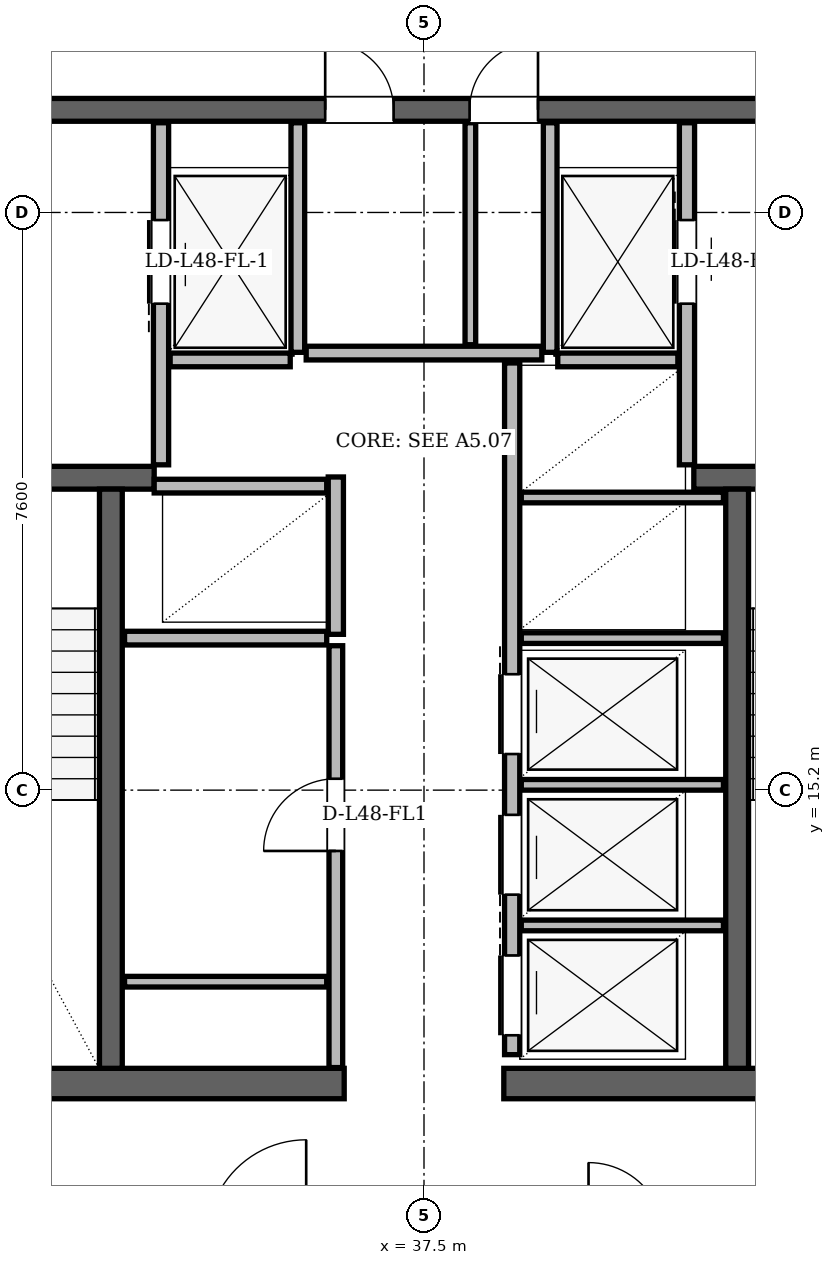
"""IFC4 building model, lengths in metres.
Left out: names, types, materials, properties, quantities, classifications, styles, units other than length and angle.
Written with IfcOpenShell. Run it as: python <this file> out.ifc"""

import sys

from ifc_helpers import new_model, si_unit, direction, frame, frame_2d, origin, place, context, subcontext, project, spatial, rectangle, extrude, element, fill, save


model = new_model("IFC4")
c1 = context("Model", 3, precision=1e-05, world=origin(), true_north=direction((0.0, 1.0)))
c2 = subcontext(c1, "Body", "Model", "MODEL_VIEW")
j1 = project(units=[si_unit("LENGTHUNIT", "METRE"), si_unit("PLANEANGLEUNIT", "RADIAN")], contexts=[c1])
p1 = place(None, origin())
s1 = spatial("IfcSite", under=j1, at=p1, CompositionType="ELEMENT")
p2 = place(p1, origin())
s2 = spatial("IfcBuilding", under=s1, at=p2, CompositionType="ELEMENT")
p3 = place(p2, frame((0.0, 0.0, 181.8)))
s3 = spatial("IfcBuildingStorey", under=s2, at=p3, CompositionType="ELEMENT", Elevation=181.8)
for number, where, z_axis, x_axis in (
    (1, (29.35, 11.34, 0.0), (0.0, 0.0, 1.0), (1.0, 0.0, 0.0)),
    (2, (38.55, 11.34, 0.0), (0.0, 0.0, 1.0), (1.0, 0.0, 0.0)),
):
    element("IfcWall", number, at=place(p3, frame(where, z_axis=z_axis, x_axis=x_axis)), inside=s3, PredefinedType="SHEAR", context=c2, shape_type="SweptSolid", body=[
        extrude(rectangle(XDim=7.1, YDim=0.4, at=frame_2d((3.55, 0.0))), origin(), (0.0, 0.0, 1.0), 3.38),
    ])
p4 = place(p3, frame((29.65, 24.15, 0.0), z_axis=(0.0, 0.0, 1.0), x_axis=(1.0, 0.0, 0.0)))
e3 = element("IfcWall", 3, at=p4, inside=s3, PredefinedType="SHEAR", context=c2, shape_type="SweptSolid", body=[
    extrude(rectangle(XDim=15.7, YDim=0.3, at=frame_2d((7.85, 0.0))), origin(), (0.0, 0.0, 1.0), 3.38),
])
p5 = place(p4, frame((1.7, 0.0, 0.0)))
e4 = element("IfcOpeningElement", 4, at=p5, cuts=e3, PredefinedType="OPENING", context=c2, shape_type="SweptSolid", body=[
    extrude(rectangle(XDim=1.2, YDim=2.2, at=frame_2d((0.6, 1.1))), frame((0.0, 0.15, 0.0), z_axis=(0.0, -1.0, 0.0), x_axis=(1.0, 0.0, 0.0)), (0.0, 0.0, 1.0), 0.3),
])
p6 = place(p4, frame((12.8, 0.0, 0.0)))
e5 = element("IfcOpeningElement", 5, at=p6, cuts=e3, PredefinedType="OPENING", context=c2, shape_type="SweptSolid", body=[
    extrude(rectangle(XDim=1.2, YDim=2.2, at=frame_2d((0.6, 1.1))), frame((0.0, 0.15, 0.0), z_axis=(0.0, -1.0, 0.0), x_axis=(1.0, 0.0, 0.0)), (0.0, 0.0, 1.0), 0.3),
])
p7 = place(p4, frame((6.55, 0.0, 0.0)))
e6 = element("IfcOpeningElement", 6, at=p7, cuts=e3, PredefinedType="OPENING", context=c2, shape_type="SweptSolid", body=[
    extrude(rectangle(XDim=0.9, YDim=2.05, at=frame_2d((0.45, 1.025))), frame((0.0, 0.15, 0.0), z_axis=(0.0, -1.0, 0.0), x_axis=(1.0, 0.0, 0.0)), (0.0, 0.0, 1.0), 0.3),
])
p8 = place(p4, frame((8.45, 0.0, 0.0)))
e7 = element("IfcOpeningElement", 7, at=p8, cuts=e3, PredefinedType="OPENING", context=c2, shape_type="SweptSolid", body=[
    extrude(rectangle(XDim=0.9, YDim=2.05, at=frame_2d((0.45, 1.025))), frame((0.0, 0.15, 0.0), z_axis=(0.0, -1.0, 0.0), x_axis=(1.0, 0.0, 0.0)), (0.0, 0.0, 1.0), 0.3),
])
p9 = place(p3, frame((29.94, 19.31, 0.0), z_axis=(0.0, 0.0, 1.0), x_axis=(1.0, 0.0, 0.0)))
e8 = element("IfcWall", 8, at=p9, inside=s3, PredefinedType="SHEAR", context=c2, shape_type="SweptSolid", body=[
    extrude(rectangle(XDim=4.01, YDim=0.3, at=frame_2d((2.005, 0.0))), origin(), (0.0, 0.0, 1.0), 3.38),
])
p10 = place(p9, frame((1.01, 0.0, 0.0)))
e9 = element("IfcOpeningElement", 9, at=p10, cuts=e8, PredefinedType="OPENING", context=c2, shape_type="SweptSolid", body=[
    extrude(rectangle(XDim=1.4, YDim=2.2, at=frame_2d((0.7, 1.1))), frame((0.0, 0.15, 0.0), z_axis=(0.0, -1.0, 0.0), x_axis=(1.0, 0.0, 0.0)), (0.0, 0.0, 1.0), 0.3),
])
p11 = place(p3, frame((41.05, 19.31, 0.0), z_axis=(0.0, 0.0, 1.0), x_axis=(1.0, 0.0, 0.0)))
e10 = element("IfcWall", 10, at=p11, inside=s3, PredefinedType="SHEAR", context=c2, shape_type="SweptSolid", body=[
    extrude(rectangle(XDim=4.01, YDim=0.3, at=frame_2d((2.005, 0.0))), origin(), (0.0, 0.0, 1.0), 3.38),
])
p12 = place(p11, frame((1.6, 0.0, 0.0)))
e11 = element("IfcOpeningElement", 11, at=p12, cuts=e10, PredefinedType="OPENING", context=c2, shape_type="SweptSolid", body=[
    extrude(rectangle(XDim=1.4, YDim=2.2, at=frame_2d((0.7, 1.1))), frame((0.0, 0.15, 0.0), z_axis=(0.0, -1.0, 0.0), x_axis=(1.0, 0.0, 0.0)), (0.0, 0.0, 1.0), 0.3),
])
for number, where, z_axis, x_axis in (
    (12, (33.38, 11.54, 0.0), (0.0, 0.0, 1.0), (0.0, 1.0, 0.0)),
    (13, (41.62, 11.54, 0.0), (0.0, 0.0, 1.0), (0.0, 1.0, 0.0)),
):
    element("IfcWall", number, at=place(p3, frame(where, z_axis=z_axis, x_axis=x_axis)), inside=s3, PredefinedType="SHEAR", context=c2, shape_type="SweptSolid", body=[
        extrude(rectangle(XDim=7.62, YDim=0.3, at=frame_2d((3.81, 0.0))), origin(), (0.0, 0.0, 1.0), 3.38),
    ])
p13 = place(p3, frame((59.565, 12.024, 0.0), z_axis=(0.0, 0.0, 1.0), x_axis=(-0.499997559055, 0.86602681306, 0.0)))
e14 = element("IfcWall", 14, at=p13, inside=s3, PredefinedType="SOLIDWALL", context=c2, shape_type="SweptSolid", body=[
    extrude(rectangle(XDim=36.054, YDim=0.29, at=frame_2d((18.027, 0.0))), origin(), (0.0, 0.0, 1.0), 2.6),
])
p14 = place(p13, frame((3.429, 0.0, 0.0)))
e15 = element("IfcOpeningElement", 15, at=p14, cuts=e14, PredefinedType="OPENING", context=c2, shape_type="SweptSolid", body=[
    extrude(rectangle(XDim=1.5, YDim=2.2, at=frame_2d((0.75, 1.1))), frame((0.0, 0.145, 0.0), z_axis=(0.0, -1.0, 0.0), x_axis=(1.0, 0.0, 0.0)), (0.0, 0.0, 1.0), 0.29),
])
p15 = place(p13, frame((27.779, 0.0, 0.0)))
e16 = element("IfcOpeningElement", 16, at=p15, cuts=e14, PredefinedType="OPENING", context=c2, shape_type="SweptSolid", body=[
    extrude(rectangle(XDim=1.5, YDim=2.2, at=frame_2d((0.75, 1.1))), frame((0.0, 0.145, 0.0), z_axis=(0.0, -1.0, 0.0), x_axis=(1.0, 0.0, 0.0)), (0.0, 0.0, 1.0), 0.29),
])
p16 = place(p13, frame((1.672, 0.0, 0.85)))
e17 = element("IfcOpeningElement", 17, at=p16, cuts=e14, PredefinedType="OPENING", context=c2, shape_type="SweptSolid", body=[
    extrude(rectangle(XDim=1.2, YDim=1.48, at=frame_2d((0.6, 0.74))), frame((0.0, 0.145, 0.0), z_axis=(0.0, -1.0, 0.0), x_axis=(1.0, 0.0, 0.0)), (0.0, 0.0, 1.0), 0.29),
])
p17 = place(p13, frame((14.332, 0.0, 0.85)))
e18 = element("IfcOpeningElement", 18, at=p17, cuts=e14, PredefinedType="OPENING", context=c2, shape_type="SweptSolid", body=[
    extrude(rectangle(XDim=1.2, YDim=1.48, at=frame_2d((0.6, 0.74))), frame((0.0, 0.145, 0.0), z_axis=(0.0, -1.0, 0.0), x_axis=(1.0, 0.0, 0.0)), (0.0, 0.0, 1.0), 0.29),
])
p18 = place(p13, frame((21.605, 0.0, 0.85)))
e19 = element("IfcOpeningElement", 19, at=p18, cuts=e14, PredefinedType="OPENING", context=c2, shape_type="SweptSolid", body=[
    extrude(rectangle(XDim=2.8, YDim=1.64, at=frame_2d((1.4, 0.82))), frame((0.0, 0.145, 0.0), z_axis=(0.0, -1.0, 0.0), x_axis=(1.0, 0.0, 0.0)), (0.0, 0.0, 1.0), 0.29),
])
p19 = place(p13, frame((7.301, 0.0, 0.85)))
e20 = element("IfcOpeningElement", 20, at=p19, cuts=e14, PredefinedType="OPENING", context=c2, shape_type="SweptSolid", body=[
    extrude(rectangle(XDim=1.2, YDim=1.48, at=frame_2d((0.6, 0.74))), frame((0.0, 0.145, 0.0), z_axis=(0.0, -1.0, 0.0), x_axis=(1.0, 0.0, 0.0)), (0.0, 0.0, 1.0), 0.29),
])
p20 = place(p13, frame((25.885, 0.0, 0.85)))
e21 = element("IfcOpeningElement", 21, at=p20, cuts=e14, PredefinedType="OPENING", context=c2, shape_type="SweptSolid", body=[
    extrude(rectangle(XDim=1.2, YDim=1.48, at=frame_2d((0.6, 0.74))), frame((0.0, 0.145, 0.0), z_axis=(0.0, -1.0, 0.0), x_axis=(1.0, 0.0, 0.0)), (0.0, 0.0, 1.0), 0.29),
])
p21 = place(p13, frame((32.282, 0.0, 0.85)))
e22 = element("IfcOpeningElement", 22, at=p21, cuts=e14, PredefinedType="OPENING", context=c2, shape_type="SweptSolid", body=[
    extrude(rectangle(XDim=1.6, YDim=1.64, at=frame_2d((0.8, 0.82))), frame((0.0, 0.145, 0.0), z_axis=(0.0, -1.0, 0.0), x_axis=(1.0, 0.0, 0.0)), (0.0, 0.0, 1.0), 0.29),
])
p22 = place(p3, frame((33.461, 43.247, 0.0), z_axis=(0.0, 0.0, 1.0), x_axis=(-0.499997559055, -0.86602681306, 0.0)))
e23 = element("IfcWall", 23, at=p22, inside=s3, PredefinedType="SOLIDWALL", context=c2, shape_type="SweptSolid", body=[
    extrude(rectangle(XDim=36.054, YDim=0.29, at=frame_2d((18.027, 0.0))), origin(), (0.0, 0.0, 1.0), 2.6),
])
p23 = place(p22, frame((6.579, 0.0, 0.0)))
e24 = element("IfcOpeningElement", 24, at=p23, cuts=e23, PredefinedType="OPENING", context=c2, shape_type="SweptSolid", body=[
    extrude(rectangle(XDim=1.5, YDim=2.2, at=frame_2d((0.75, 1.1))), frame((0.0, 0.145, 0.0), z_axis=(0.0, -1.0, 0.0), x_axis=(1.0, 0.0, 0.0)), (0.0, 0.0, 1.0), 0.29),
])
p24 = place(p22, frame((26.519, 0.0, 0.0)))
e25 = element("IfcOpeningElement", 25, at=p24, cuts=e23, PredefinedType="OPENING", context=c2, shape_type="SweptSolid", body=[
    extrude(rectangle(XDim=1.5, YDim=2.2, at=frame_2d((0.75, 1.1))), frame((0.0, 0.145, 0.0), z_axis=(0.0, -1.0, 0.0), x_axis=(1.0, 0.0, 0.0)), (0.0, 0.0, 1.0), 0.29),
])
p25 = place(p22, frame((33.788, 0.0, 0.85)))
e26 = element("IfcOpeningElement", 26, at=p25, cuts=e23, PredefinedType="OPENING", context=c2, shape_type="SweptSolid", body=[
    extrude(rectangle(XDim=1.2, YDim=1.48, at=frame_2d((0.6, 0.74))), frame((0.0, 0.145, 0.0), z_axis=(0.0, -1.0, 0.0), x_axis=(1.0, 0.0, 0.0)), (0.0, 0.0, 1.0), 0.29),
])
p26 = place(p22, frame((18.57, 0.0, 0.85)))
e27 = element("IfcOpeningElement", 27, at=p26, cuts=e23, PredefinedType="OPENING", context=c2, shape_type="SweptSolid", body=[
    extrude(rectangle(XDim=2.0, YDim=1.64, at=frame_2d((1.0, 0.82))), frame((0.0, 0.145, 0.0), z_axis=(0.0, -1.0, 0.0), x_axis=(1.0, 0.0, 0.0)), (0.0, 0.0, 1.0), 0.29),
])
p27 = place(p22, frame((12.794, 0.0, 0.85)))
e28 = element("IfcOpeningElement", 28, at=p27, cuts=e23, PredefinedType="OPENING", context=c2, shape_type="SweptSolid", body=[
    extrude(rectangle(XDim=1.2, YDim=1.48, at=frame_2d((0.6, 0.74))), frame((0.0, 0.145, 0.0), z_axis=(0.0, -1.0, 0.0), x_axis=(1.0, 0.0, 0.0)), (0.0, 0.0, 1.0), 0.29),
])
p28 = place(p22, frame((15.496, 0.0, 0.85)))
e29 = element("IfcOpeningElement", 29, at=p28, cuts=e23, PredefinedType="OPENING", context=c2, shape_type="SweptSolid", body=[
    extrude(rectangle(XDim=1.2, YDim=1.48, at=frame_2d((0.6, 0.74))), frame((0.0, 0.145, 0.0), z_axis=(0.0, -1.0, 0.0), x_axis=(1.0, 0.0, 0.0)), (0.0, 0.0, 1.0), 0.29),
])
p29 = place(p22, frame((1.108, 0.0, 0.85)))
e30 = element("IfcOpeningElement", 30, at=p29, cuts=e23, PredefinedType="OPENING", context=c2, shape_type="SweptSolid", body=[
    extrude(rectangle(XDim=2.0, YDim=1.64, at=frame_2d((1.0, 0.82))), frame((0.0, 0.145, 0.0), z_axis=(0.0, -1.0, 0.0), x_axis=(1.0, 0.0, 0.0)), (0.0, 0.0, 1.0), 0.29),
])
p30 = place(p3, frame((34.04, 19.48, 0.0), z_axis=(0.0, 0.0, 1.0), x_axis=(0.0, 1.0, 0.0)))
e31 = element("IfcWall", 31, at=p30, inside=s3, PredefinedType="PARTITIONING", context=c2, shape_type="SweptSolid", body=[
    extrude(rectangle(XDim=4.5, YDim=0.2, at=frame_2d((2.25, 0.0))), origin(), (0.0, 0.0, 1.0), 3.38),
])
p31 = place(p30, frame((2.12, 0.0, 0.0)))
e32 = element("IfcOpeningElement", 32, at=p31, cuts=e31, PredefinedType="OPENING", context=c2, shape_type="SweptSolid", body=[
    extrude(rectangle(XDim=1.1, YDim=2.2, at=frame_2d((0.55, 1.1))), frame((0.0, 0.1, 0.0), z_axis=(0.0, -1.0, 0.0), x_axis=(1.0, 0.0, 0.0)), (0.0, 0.0, 1.0), 0.2),
])
p32 = place(p3, frame((35.84, 20.96, 0.0), z_axis=(0.0, 0.0, 1.0), x_axis=(0.0, 1.0, 0.0)))
e33 = element("IfcWall", 33, at=p32, inside=s3, PredefinedType="PARTITIONING", context=c2, shape_type="SweptSolid", body=[
    extrude(rectangle(XDim=3.02, YDim=0.18, at=frame_2d((1.51, 0.0))), origin(), (0.0, 0.0, 1.0), 3.38),
])
p33 = place(p3, frame((34.16, 20.86, 0.0), z_axis=(0.0, 0.0, 1.0), x_axis=(1.0, 0.0, 0.0)))
e34 = element("IfcWall", 34, at=p33, inside=s3, PredefinedType="PARTITIONING", context=c2, shape_type="SweptSolid", body=[
    extrude(rectangle(XDim=1.58, YDim=0.18, at=frame_2d((0.79, 0.0))), origin(), (0.0, 0.0, 1.0), 3.38),
])
p34 = place(p3, frame((40.96, 19.48, 0.0), z_axis=(0.0, 0.0, 1.0), x_axis=(0.0, 1.0, 0.0)))
e35 = element("IfcWall", 35, at=p34, inside=s3, PredefinedType="PARTITIONING", context=c2, shape_type="SweptSolid", body=[
    extrude(rectangle(XDim=4.5, YDim=0.2, at=frame_2d((2.25, 0.0))), origin(), (0.0, 0.0, 1.0), 3.38),
])
p35 = place(p34, frame((2.12, 0.0, 0.0)))
e36 = element("IfcOpeningElement", 36, at=p35, cuts=e35, PredefinedType="OPENING", context=c2, shape_type="SweptSolid", body=[
    extrude(rectangle(XDim=1.1, YDim=2.2, at=frame_2d((0.55, 1.1))), frame((0.0, 0.1, 0.0), z_axis=(0.0, -1.0, 0.0), x_axis=(1.0, 0.0, 0.0)), (0.0, 0.0, 1.0), 0.2),
])
p36 = place(p3, frame((39.16, 20.96, 0.0), z_axis=(0.0, 0.0, 1.0), x_axis=(0.0, 1.0, 0.0)))
e37 = element("IfcWall", 37, at=p36, inside=s3, PredefinedType="PARTITIONING", context=c2, shape_type="SweptSolid", body=[
    extrude(rectangle(XDim=3.02, YDim=0.18, at=frame_2d((1.51, 0.0))), origin(), (0.0, 0.0, 1.0), 3.38),
])
p37 = place(p3, frame((39.26, 20.86, 0.0), z_axis=(0.0, 0.0, 1.0), x_axis=(1.0, 0.0, 0.0)))
e38 = element("IfcWall", 38, at=p37, inside=s3, PredefinedType="PARTITIONING", context=c2, shape_type="SweptSolid", body=[
    extrude(rectangle(XDim=1.58, YDim=0.18, at=frame_2d((0.79, 0.0))), origin(), (0.0, 0.0, 1.0), 3.38),
])
p38 = place(p3, frame((36.34, 17.25, 0.0), z_axis=(0.0, 0.0, 1.0), x_axis=(0.0, 1.0, 0.0)))
e39 = element("IfcWall", 39, at=p38, inside=s3, PredefinedType="PARTITIONING", context=c2, shape_type="SweptSolid", body=[
    extrude(rectangle(XDim=2.07, YDim=0.2, at=frame_2d((1.035, 0.0))), origin(), (0.0, 0.0, 1.0), 3.38),
])
p39 = place(p3, frame((33.95, 19.2, 0.0), z_axis=(0.0, 0.0, 1.0), x_axis=(1.0, 0.0, 0.0)))
e40 = element("IfcWall", 40, at=p39, inside=s3, PredefinedType="PARTITIONING", context=c2, shape_type="SweptSolid", body=[
    extrude(rectangle(XDim=2.27, YDim=0.18, at=frame_2d((1.135, 0.0))), origin(), (0.0, 0.0, 1.0), 3.38),
])
p40 = place(p3, frame((33.56, 17.2, 0.0), z_axis=(0.0, 0.0, 1.0), x_axis=(1.0, 0.0, 0.0)))
e41 = element("IfcWall", 41, at=p40, inside=s3, PredefinedType="PARTITIONING", context=c2, shape_type="SweptSolid", body=[
    extrude(rectangle(XDim=2.66, YDim=0.18, at=frame_2d((1.33, 0.0))), origin(), (0.0, 0.0, 1.0), 3.38),
])
p41 = place(p3, frame((36.34, 11.55, 0.0), z_axis=(0.0, 0.0, 1.0), x_axis=(0.0, 1.0, 0.0)))
e42 = element("IfcWall", 42, at=p41, inside=s3, PredefinedType="PARTITIONING", context=c2, shape_type="SweptSolid", body=[
    extrude(rectangle(XDim=5.55, YDim=0.18, at=frame_2d((2.775, 0.0))), origin(), (0.0, 0.0, 1.0), 3.38),
])
p42 = place(p41, frame((2.85, 0.0, 0.0)))
e43 = element("IfcOpeningElement", 43, at=p42, cuts=e42, PredefinedType="OPENING", context=c2, shape_type="SweptSolid", body=[
    extrude(rectangle(XDim=0.95, YDim=2.1, at=frame_2d((0.475, 1.05))), frame((0.0, 0.09, 0.0), z_axis=(0.0, -1.0, 0.0), x_axis=(1.0, 0.0, 0.0)), (0.0, 0.0, 1.0), 0.18),
])
p43 = place(p3, frame((33.56, 12.68, 0.0), z_axis=(0.0, 0.0, 1.0), x_axis=(1.0, 0.0, 0.0)))
e44 = element("IfcWall", 44, at=p43, inside=s3, PredefinedType="PARTITIONING", context=c2, shape_type="SweptSolid", body=[
    extrude(rectangle(XDim=2.66, YDim=0.14, at=frame_2d((1.33, 0.0))), origin(), (0.0, 0.0, 1.0), 3.38),
])
p44 = place(p3, frame((38.66, 11.72, 0.0), z_axis=(0.0, 0.0, 1.0), x_axis=(0.0, 1.0, 0.0)))
e45 = element("IfcWall", 45, at=p44, inside=s3, PredefinedType="PARTITIONING", context=c2, shape_type="SweptSolid", body=[
    extrude(rectangle(XDim=9.1, YDim=0.2, at=frame_2d((4.55, 0.0))), origin(), (0.0, 0.0, 1.0), 3.38),
])
p45 = place(p44, frame((0.255, 0.0, 0.0)))
e46 = element("IfcOpeningElement", 46, at=p45, cuts=e45, PredefinedType="OPENING", context=c2, shape_type="SweptSolid", body=[
    extrude(rectangle(XDim=1.05, YDim=2.15, at=frame_2d((0.525, 1.075))), frame((0.0, 0.1, 0.0), z_axis=(0.0, -1.0, 0.0), x_axis=(1.0, 0.0, 0.0)), (0.0, 0.0, 1.0), 0.2),
])
p46 = place(p44, frame((2.105, 0.0, 0.0)))
e47 = element("IfcOpeningElement", 47, at=p46, cuts=e45, PredefinedType="OPENING", context=c2, shape_type="SweptSolid", body=[
    extrude(rectangle(XDim=1.05, YDim=2.15, at=frame_2d((0.525, 1.075))), frame((0.0, 0.1, 0.0), z_axis=(0.0, -1.0, 0.0), x_axis=(1.0, 0.0, 0.0)), (0.0, 0.0, 1.0), 0.2),
])
p47 = place(p44, frame((3.955, 0.0, 0.0)))
e48 = element("IfcOpeningElement", 48, at=p47, cuts=e45, PredefinedType="OPENING", context=c2, shape_type="SweptSolid", body=[
    extrude(rectangle(XDim=1.05, YDim=2.15, at=frame_2d((0.525, 1.075))), frame((0.0, 0.1, 0.0), z_axis=(0.0, -1.0, 0.0), x_axis=(1.0, 0.0, 0.0)), (0.0, 0.0, 1.0), 0.2),
])
for number, where, z_axis, x_axis in (
    (49, (38.78, 13.42, 0.0), (0.0, 0.0, 1.0), (1.0, 0.0, 0.0)),
    (50, (38.78, 15.27, 0.0), (0.0, 0.0, 1.0), (1.0, 0.0, 0.0)),
    (51, (38.78, 17.2, 0.0), (0.0, 0.0, 1.0), (1.0, 0.0, 0.0)),
    (52, (38.78, 19.05, 0.0), (0.0, 0.0, 1.0), (1.0, 0.0, 0.0)),
):
    element("IfcWall", number, at=place(p3, frame(where, z_axis=z_axis, x_axis=x_axis)), inside=s3, PredefinedType="PARTITIONING", context=c2, shape_type="SweptSolid", body=[
        extrude(rectangle(XDim=2.66, YDim=0.14, at=frame_2d((1.33, 0.0))), origin(), (0.0, 0.0, 1.0), 3.38),
    ])
p48 = place(p3, frame((35.95, 20.95, 0.0), z_axis=(0.0, 0.0, 1.0), x_axis=(1.0, 0.0, 0.0)))
e53 = element("IfcWall", 53, at=p48, inside=s3, PredefinedType="PARTITIONING", context=c2, shape_type="SweptSolid", body=[
    extrude(rectangle(XDim=3.1, YDim=0.18, at=frame_2d((1.55, 0.0))), origin(), (0.0, 0.0, 1.0), 3.38),
])
p49 = place(p3, frame((38.11, 21.06, 0.0), z_axis=(0.0, 0.0, 1.0), x_axis=(0.0, 1.0, 0.0)))
e54 = element("IfcWall", 54, at=p49, inside=s3, PredefinedType="PARTITIONING", context=c2, shape_type="SweptSolid", body=[
    extrude(rectangle(XDim=2.92, YDim=0.14, at=frame_2d((1.46, 0.0))), origin(), (0.0, 0.0, 1.0), 3.38),
])
p50 = place(p42, origin())
e55 = element("IfcDoor", 55, at=p50, inside=s3, OperationType="SINGLE_SWING_LEFT", PredefinedType="DOOR", context=c2, shape_type="SweptSolid", body=[
    extrude(rectangle(XDim=0.95, YDim=2.1, at=frame_2d((0.475, 1.05))), frame((0.0, 0.025, 0.0), z_axis=(0.0, -1.0, 0.0), x_axis=(1.0, 0.0, 0.0)), (0.0, 0.0, 1.0), 0.05),
])
fill(e43, e55)
p51 = place(p31, origin())
e56 = element("IfcDoor", 56, at=p51, inside=s3, OperationType="SLIDING_TO_LEFT", PredefinedType="DOOR", context=c2, shape_type="SweptSolid", body=[
    extrude(rectangle(XDim=1.1, YDim=2.2, at=frame_2d((0.55, 1.1))), frame((0.0, 0.025, 0.0), z_axis=(0.0, -1.0, 0.0), x_axis=(1.0, 0.0, 0.0)), (0.0, 0.0, 1.0), 0.05),
])
fill(e32, e56)
p52 = place(p35, origin())
e57 = element("IfcDoor", 57, at=p52, inside=s3, OperationType="SLIDING_TO_RIGHT", PredefinedType="DOOR", context=c2, shape_type="SweptSolid", body=[
    extrude(rectangle(XDim=1.1, YDim=2.2, at=frame_2d((0.55, 1.1))), frame((0.0, 0.025, 0.0), z_axis=(0.0, -1.0, 0.0), x_axis=(1.0, 0.0, 0.0)), (0.0, 0.0, 1.0), 0.05),
])
fill(e36, e57)
p53 = place(p45, origin())
e58 = element("IfcDoor", 58, at=p53, inside=s3, OperationType="SLIDING_TO_RIGHT", PredefinedType="DOOR", context=c2, shape_type="SweptSolid", body=[
    extrude(rectangle(XDim=1.05, YDim=2.15, at=frame_2d((0.525, 1.075))), frame((0.0, 0.025, 0.0), z_axis=(0.0, -1.0, 0.0), x_axis=(1.0, 0.0, 0.0)), (0.0, 0.0, 1.0), 0.05),
])
fill(e46, e58)
p54 = place(p46, origin())
e59 = element("IfcDoor", 59, at=p54, inside=s3, OperationType="SLIDING_TO_LEFT", PredefinedType="DOOR", context=c2, shape_type="SweptSolid", body=[
    extrude(rectangle(XDim=1.05, YDim=2.15, at=frame_2d((0.525, 1.075))), frame((0.0, 0.025, 0.0), z_axis=(0.0, -1.0, 0.0), x_axis=(1.0, 0.0, 0.0)), (0.0, 0.0, 1.0), 0.05),
])
fill(e47, e59)
p55 = place(p47, origin())
e60 = element("IfcDoor", 60, at=p55, inside=s3, OperationType="SLIDING_TO_RIGHT", PredefinedType="DOOR", context=c2, shape_type="SweptSolid", body=[
    extrude(rectangle(XDim=1.05, YDim=2.15, at=frame_2d((0.525, 1.075))), frame((0.0, 0.025, 0.0), z_axis=(0.0, -1.0, 0.0), x_axis=(1.0, 0.0, 0.0)), (0.0, 0.0, 1.0), 0.05),
])
fill(e48, e60)
p56 = place(p7, origin())
e61 = element("IfcDoor", 61, at=p56, inside=s3, OperationType="SINGLE_SWING_LEFT", PredefinedType="DOOR", context=c2, shape_type="SweptSolid", body=[
    extrude(rectangle(XDim=0.9, YDim=2.05, at=frame_2d((0.45, 1.025))), frame((0.0, 0.025, 0.0), z_axis=(0.0, -1.0, 0.0), x_axis=(1.0, 0.0, 0.0)), (0.0, 0.0, 1.0), 0.05),
])
fill(e6, e61)
p57 = place(p8, origin())
e62 = element("IfcDoor", 62, at=p57, inside=s3, OperationType="SINGLE_SWING_RIGHT", PredefinedType="DOOR", context=c2, shape_type="SweptSolid", body=[
    extrude(rectangle(XDim=0.9, YDim=2.05, at=frame_2d((0.45, 1.025))), frame((0.0, 0.025, 0.0), z_axis=(0.0, -1.0, 0.0), x_axis=(1.0, 0.0, 0.0)), (0.0, 0.0, 1.0), 0.05),
])
fill(e7, e62)
save(model, sys.argv[1])
